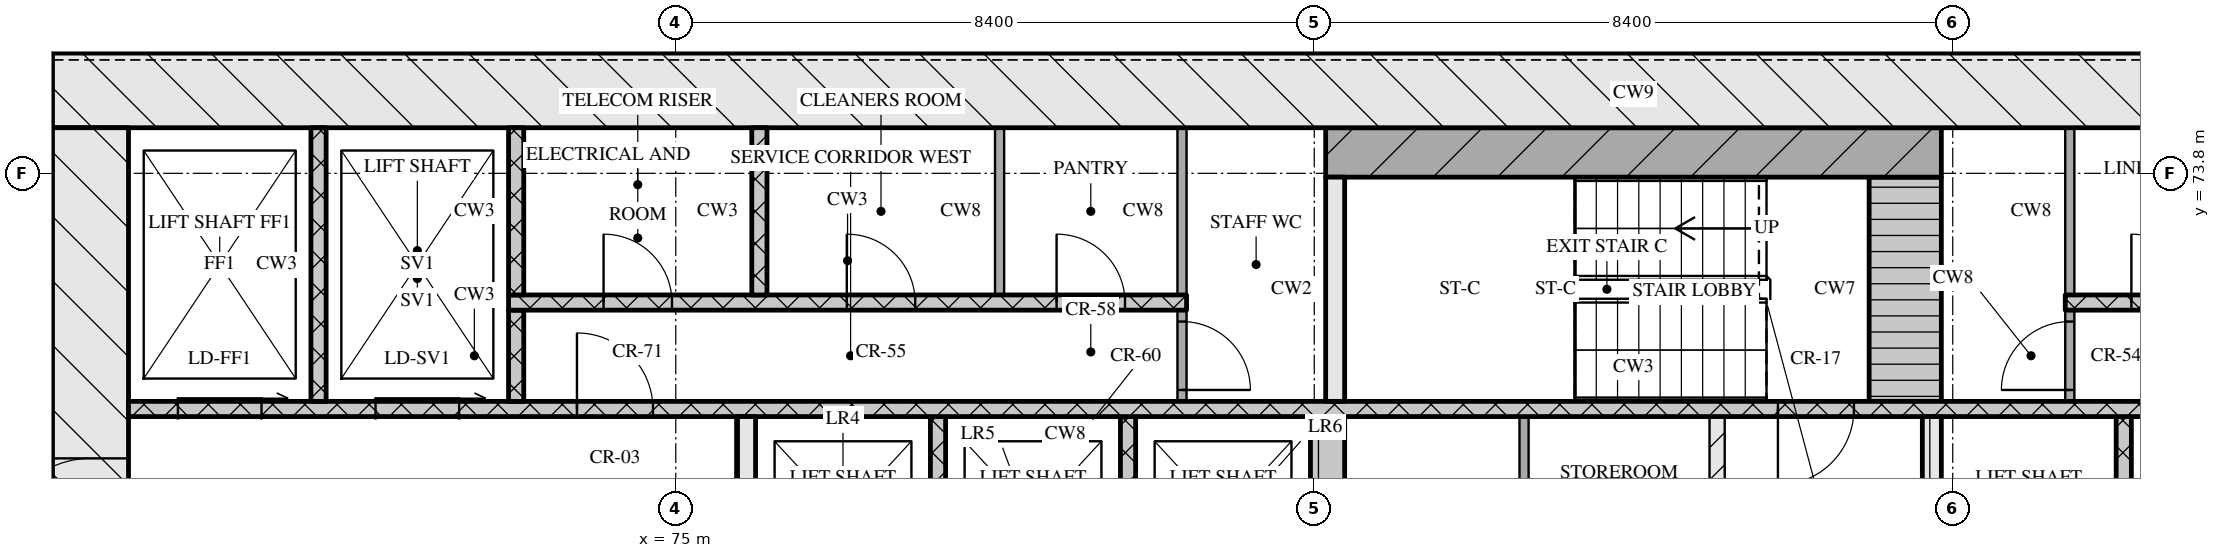
"""IFC4 building model, lengths in metres.
Left out: names, types, materials, properties, quantities, classifications, styles, units other than length and angle.
Written with IfcOpenShell. Run it as: python <this file> out.ifc"""

import sys

from ifc_helpers import new_model, si_unit, direction, frame, frame_2d, origin, place, context, subcontext, project, spatial, rectangle, extrude, element, fill, save


model = new_model("IFC4")
c1 = context("Model", 3, precision=1e-05, world=origin(), true_north=direction((0.0, 1.0)))
c2 = subcontext(c1, "Body", "Model", "MODEL_VIEW")
j1 = project(units=[si_unit("LENGTHUNIT", "METRE"), si_unit("PLANEANGLEUNIT", "RADIAN")], contexts=[c1])
p1 = place(None, origin())
s1 = spatial("IfcSite", under=j1, at=p1, CompositionType="ELEMENT")
p2 = place(p1, origin())
s2 = spatial("IfcBuilding", under=s1, at=p2, CompositionType="ELEMENT")
p3 = place(p2, frame((0.0, 0.0, 95.25)))
s3 = spatial("IfcBuildingStorey", under=s2, at=p3, CompositionType="ELEMENT", Elevation=95.25)
p4 = place(p3, frame((66.8, 74.9, 0.0), z_axis=(0.0, 0.0, 1.0), x_axis=(1.0, 0.0, 0.0)))
e1 = element("IfcWall", 1, at=p4, inside=s3, PredefinedType="SOLIDWALL", context=c2, shape_type="SweptSolid", body=[
    extrude(rectangle(XDim=41.6, YDim=1.0, at=frame_2d((20.8, 0.0))), origin(), (0.0, 0.0, 1.0), 3.32),
])
p5 = place(p3, frame((67.3, 62.4, 0.0), z_axis=(0.0, 0.0, 1.0), x_axis=(0.0, 1.0, 0.0)))
e2 = element("IfcWall", 2, at=p5, inside=s3, PredefinedType="SOLIDWALL", context=c2, shape_type="SweptSolid", body=[
    extrude(rectangle(XDim=12.0, YDim=1.0, at=frame_2d((6.0, 0.0))), origin(), (0.0, 0.0, 1.0), 3.32),
])
p6 = place(p5, frame((6.45, 0.0, 0.0)))
e3 = element("IfcOpeningElement", 3, at=p6, cuts=e2, PredefinedType="OPENING", context=c2, shape_type="SweptSolid", body=[
    extrude(rectangle(XDim=1.2, YDim=2.1, at=frame_2d((0.6, 1.05))), frame((0.0, 0.51, 0.0), z_axis=(0.0, -1.0, 0.0), x_axis=(1.0, 0.0, 0.0)), (0.0, 0.0, 1.0), 1.02),
])
for number, where, z_axis, x_axis in (
    (4, (78.45, 68.0, 0.0), (0.0, 0.0, 1.0), (0.0, 1.0, 0.0)),
    (5, (80.95, 68.0, 0.0), (0.0, 0.0, 1.0), (0.0, 1.0, 0.0)),
):
    element("IfcWall", number, at=place(p3, frame(where, z_axis=z_axis, x_axis=x_axis)), inside=s3, PredefinedType="SOLIDWALL", context=c2, shape_type="SweptSolid", body=[
        extrude(rectangle(XDim=2.6, YDim=0.2, at=frame_2d((1.3, 0.0))), origin(), (0.0, 0.0, 1.0), 3.32),
    ])
p7 = place(p3, frame((83.575, 68.0, 0.0), z_axis=(0.0, 0.0, 1.0), x_axis=(0.0, 1.0, 0.0)))
e6 = element("IfcWall", 6, at=p7, inside=s3, PredefinedType="SOLIDWALL", context=c2, shape_type="SweptSolid", body=[
    extrude(rectangle(XDim=2.6, YDim=0.45, at=frame_2d((1.3, 0.0))), origin(), (0.0, 0.0, 1.0), 3.32),
])
p8 = place(p3, frame((86.16, 68.0, 0.0), z_axis=(0.0, 0.0, 1.0), x_axis=(0.0, 1.0, 0.0)))
e7 = element("IfcWall", 7, at=p8, inside=s3, PredefinedType="PARTITIONING", context=c2, shape_type="SweptSolid", body=[
    extrude(rectangle(XDim=2.6, YDim=0.12, at=frame_2d((1.3, 0.0))), origin(), (0.0, 0.0, 1.0), 3.32),
])
p9 = place(p3, frame((88.7, 68.0, 0.0), z_axis=(0.0, 0.0, 1.0), x_axis=(0.0, 1.0, 0.0)))
e8 = element("IfcWall", 8, at=p9, inside=s3, PredefinedType="PARTITIONING", context=c2, shape_type="SweptSolid", body=[
    extrude(rectangle(XDim=2.6, YDim=0.2, at=frame_2d((1.3, 0.0))), origin(), (0.0, 0.0, 1.0), 3.32),
])
p10 = place(p3, frame((91.525, 68.0, 0.0), z_axis=(0.0, 0.0, 1.0), x_axis=(0.0, 1.0, 0.0)))
e9 = element("IfcWall", 9, at=p10, inside=s3, PredefinedType="SOLIDWALL", context=c2, shape_type="SweptSolid", body=[
    extrude(rectangle(XDim=2.6, YDim=0.25, at=frame_2d((1.3, 0.0))), origin(), (0.0, 0.0, 1.0), 3.32),
])
p11 = place(p3, frame((94.05, 68.0, 0.0), z_axis=(0.0, 0.0, 1.0), x_axis=(0.0, 1.0, 0.0)))
e10 = element("IfcWall", 10, at=p11, inside=s3, PredefinedType="SOLIDWALL", context=c2, shape_type="SweptSolid", body=[
    extrude(rectangle(XDim=2.6, YDim=0.2, at=frame_2d((1.3, 0.0))), origin(), (0.0, 0.0, 1.0), 3.32),
])
p12 = place(p3, frame((75.925, 68.3, 0.0), z_axis=(0.0, 0.0, 1.0), x_axis=(0.0, 1.0, 0.0)))
e11 = element("IfcWall", 11, at=p12, inside=s3, PredefinedType="SOLIDWALL", context=c2, shape_type="SweptSolid", body=[
    extrude(rectangle(XDim=2.3, YDim=0.25, at=frame_2d((1.15, 0.0))), origin(), (0.0, 0.0, 1.0), 3.32),
])
p13 = place(p3, frame((67.8, 70.7, 0.0), z_axis=(0.0, 0.0, 1.0), x_axis=(1.0, 0.0, 0.0)))
e12 = element("IfcWall", 12, at=p13, inside=s3, PredefinedType="SOLIDWALL", context=c2, shape_type="SweptSolid", body=[
    extrude(rectangle(XDim=39.6, YDim=0.2, at=frame_2d((19.8, 0.0))), origin(), (0.0, 0.0, 1.0), 3.32),
])
p14 = place(p13, frame((0.65, 0.0, 0.0)))
e13 = element("IfcOpeningElement", 13, at=p14, cuts=e12, PredefinedType="OPENING", context=c2, shape_type="SweptSolid", body=[
    extrude(rectangle(XDim=1.1, YDim=2.1, at=frame_2d((0.55, 1.05))), frame((0.0, 0.11, 0.0), z_axis=(0.0, -1.0, 0.0), x_axis=(1.0, 0.0, 0.0)), (0.0, 0.0, 1.0), 0.22),
])
p15 = place(p13, frame((3.25, 0.0, 0.0)))
e14 = element("IfcOpeningElement", 14, at=p15, cuts=e12, PredefinedType="OPENING", context=c2, shape_type="SweptSolid", body=[
    extrude(rectangle(XDim=1.1, YDim=2.1, at=frame_2d((0.55, 1.05))), frame((0.0, 0.11, 0.0), z_axis=(0.0, -1.0, 0.0), x_axis=(1.0, 0.0, 0.0)), (0.0, 0.0, 1.0), 0.22),
])
p16 = place(p13, frame((5.9, 0.0, 0.0)))
e15 = element("IfcOpeningElement", 15, at=p16, cuts=e12, PredefinedType="OPENING", context=c2, shape_type="SweptSolid", body=[
    extrude(rectangle(XDim=1.0, YDim=2.1, at=frame_2d((0.5, 1.05))), frame((0.0, 0.11, 0.0), z_axis=(0.0, -1.0, 0.0), x_axis=(1.0, 0.0, 0.0)), (0.0, 0.0, 1.0), 0.22),
])
p17 = place(p13, frame((21.7, 0.0, 0.0)))
e16 = element("IfcOpeningElement", 16, at=p17, cuts=e12, PredefinedType="OPENING", context=c2, shape_type="SweptSolid", body=[
    extrude(rectangle(XDim=1.0, YDim=2.1, at=frame_2d((0.5, 1.05))), frame((0.0, 0.11, 0.0), z_axis=(0.0, -1.0, 0.0), x_axis=(1.0, 0.0, 0.0)), (0.0, 0.0, 1.0), 0.22),
])
p18 = place(p13, frame((32.7, 0.0, 0.0)))
e17 = element("IfcOpeningElement", 17, at=p18, cuts=e12, PredefinedType="OPENING", context=c2, shape_type="SweptSolid", body=[
    extrude(rectangle(XDim=1.0, YDim=2.1, at=frame_2d((0.5, 1.05))), frame((0.0, 0.11, 0.0), z_axis=(0.0, -1.0, 0.0), x_axis=(1.0, 0.0, 0.0)), (0.0, 0.0, 1.0), 0.22),
])
p19 = place(p13, frame((35.25, 0.0, 0.0)))
e18 = element("IfcOpeningElement", 18, at=p19, cuts=e12, PredefinedType="OPENING", context=c2, shape_type="SweptSolid", body=[
    extrude(rectangle(XDim=1.1, YDim=2.1, at=frame_2d((0.55, 1.05))), frame((0.0, 0.11, 0.0), z_axis=(0.0, -1.0, 0.0), x_axis=(1.0, 0.0, 0.0)), (0.0, 0.0, 1.0), 0.22),
])
p20 = place(p13, frame((37.85, 0.0, 0.0)))
e19 = element("IfcOpeningElement", 19, at=p20, cuts=e12, PredefinedType="OPENING", context=c2, shape_type="SweptSolid", body=[
    extrude(rectangle(XDim=1.1, YDim=2.1, at=frame_2d((0.55, 1.05))), frame((0.0, 0.11, 0.0), z_axis=(0.0, -1.0, 0.0), x_axis=(1.0, 0.0, 0.0)), (0.0, 0.0, 1.0), 0.22),
])
p21 = place(p3, frame((70.3, 70.8, 0.0), z_axis=(0.0, 0.0, 1.0), x_axis=(0.0, 1.0, 0.0)))
e20 = element("IfcWall", 20, at=p21, inside=s3, PredefinedType="SOLIDWALL", context=c2, shape_type="SweptSolid", body=[
    extrude(rectangle(XDim=3.6, YDim=0.2, at=frame_2d((1.8, 0.0))), origin(), (0.0, 0.0, 1.0), 3.32),
])
p22 = place(p3, frame((72.9, 70.8, 0.0), z_axis=(0.0, 0.0, 1.0), x_axis=(0.0, 1.0, 0.0)))
e21 = element("IfcWall", 21, at=p22, inside=s3, PredefinedType="SOLIDWALL", context=c2, shape_type="SweptSolid", body=[
    extrude(rectangle(XDim=1.2, YDim=0.2, at=frame_2d((0.6, 0.0))), origin(), (0.0, 0.0, 1.0), 3.32),
])
p23 = place(p3, frame((81.66, 70.8, 0.0), z_axis=(0.0, 0.0, 1.0), x_axis=(0.0, 1.0, 0.0)))
e22 = element("IfcWall", 22, at=p23, inside=s3, PredefinedType="PARTITIONING", context=c2, shape_type="SweptSolid", body=[
    extrude(rectangle(XDim=1.2, YDim=0.12, at=frame_2d((0.6, 0.0))), origin(), (0.0, 0.0, 1.0), 3.32),
])
p24 = place(p23, frame((0.15, 0.0, 0.0)))
e23 = element("IfcOpeningElement", 23, at=p24, cuts=e22, PredefinedType="OPENING", context=c2, shape_type="SweptSolid", body=[
    extrude(rectangle(XDim=0.9, YDim=2.1, at=frame_2d((0.45, 1.05))), frame((0.0, 0.07, 0.0), z_axis=(0.0, -1.0, 0.0), x_axis=(1.0, 0.0, 0.0)), (0.0, 0.0, 1.0), 0.14),
])
p25 = place(p3, frame((83.675, 70.8, 0.0), z_axis=(0.0, 0.0, 1.0), x_axis=(0.0, 1.0, 0.0)))
e24 = element("IfcWall", 24, at=p25, inside=s3, PredefinedType="SOLIDWALL", context=c2, shape_type="SweptSolid", body=[
    extrude(rectangle(XDim=2.95, YDim=0.25, at=frame_2d((1.475, 0.0))), origin(), (0.0, 0.0, 1.0), 3.32),
])
p26 = place(p3, frame((91.175, 70.8, 0.0), z_axis=(0.0, 0.0, 1.0), x_axis=(0.0, 1.0, 0.0)))
e25 = element("IfcWall", 25, at=p26, inside=s3, PredefinedType="SOLIDWALL", context=c2, shape_type="SweptSolid", body=[
    extrude(rectangle(XDim=2.95, YDim=0.95, at=frame_2d((1.475, 0.0))), origin(), (0.0, 0.0, 1.0), 3.32),
])
p27 = place(p3, frame((93.34, 70.8, 0.0), z_axis=(0.0, 0.0, 1.0), x_axis=(0.0, 1.0, 0.0)))
e26 = element("IfcWall", 26, at=p27, inside=s3, PredefinedType="PARTITIONING", context=c2, shape_type="SweptSolid", body=[
    extrude(rectangle(XDim=1.2, YDim=0.12, at=frame_2d((0.6, 0.0))), origin(), (0.0, 0.0, 1.0), 3.32),
])
p28 = place(p27, frame((0.15, 0.0, 0.0)))
e27 = element("IfcOpeningElement", 27, at=p28, cuts=e26, PredefinedType="OPENING", context=c2, shape_type="SweptSolid", body=[
    extrude(rectangle(XDim=0.9, YDim=2.1, at=frame_2d((0.45, 1.05))), frame((0.0, 0.07, 0.0), z_axis=(0.0, -1.0, 0.0), x_axis=(1.0, 0.0, 0.0)), (0.0, 0.0, 1.0), 0.14),
])
p29 = place(p3, frame((72.8, 72.1, 0.0), z_axis=(0.0, 0.0, 1.0), x_axis=(1.0, 0.0, 0.0)))
e28 = element("IfcWall", 28, at=p29, inside=s3, PredefinedType="SOLIDWALL", context=c2, shape_type="SweptSolid", body=[
    extrude(rectangle(XDim=8.92, YDim=0.2, at=frame_2d((4.46, 0.0))), origin(), (0.0, 0.0, 1.0), 3.32),
])
p30 = place(p29, frame((1.25, 0.0, 0.0)))
e29 = element("IfcOpeningElement", 29, at=p30, cuts=e28, PredefinedType="OPENING", context=c2, shape_type="SweptSolid", body=[
    extrude(rectangle(XDim=0.9, YDim=2.1, at=frame_2d((0.45, 1.05))), frame((0.0, 0.11, 0.0), z_axis=(0.0, -1.0, 0.0), x_axis=(1.0, 0.0, 0.0)), (0.0, 0.0, 1.0), 0.22),
])
p31 = place(p29, frame((4.45, 0.0, 0.0)))
e30 = element("IfcOpeningElement", 30, at=p31, cuts=e28, PredefinedType="OPENING", context=c2, shape_type="SweptSolid", body=[
    extrude(rectangle(XDim=0.9, YDim=2.1, at=frame_2d((0.45, 1.05))), frame((0.0, 0.11, 0.0), z_axis=(0.0, -1.0, 0.0), x_axis=(1.0, 0.0, 0.0)), (0.0, 0.0, 1.0), 0.22),
])
p32 = place(p29, frame((7.21, 0.0, 0.0)))
e31 = element("IfcOpeningElement", 31, at=p32, cuts=e28, PredefinedType="OPENING", context=c2, shape_type="SweptSolid", body=[
    extrude(rectangle(XDim=0.9, YDim=2.1, at=frame_2d((0.45, 1.05))), frame((0.0, 0.11, 0.0), z_axis=(0.0, -1.0, 0.0), x_axis=(1.0, 0.0, 0.0)), (0.0, 0.0, 1.0), 0.22),
])
p33 = place(p3, frame((93.28, 72.1, 0.0), z_axis=(0.0, 0.0, 1.0), x_axis=(1.0, 0.0, 0.0)))
e32 = element("IfcWall", 32, at=p33, inside=s3, PredefinedType="SOLIDWALL", context=c2, shape_type="SweptSolid", body=[
    extrude(rectangle(XDim=9.12, YDim=0.2, at=frame_2d((4.56, 0.0))), origin(), (0.0, 0.0, 1.0), 3.32),
])
p34 = place(p33, frame((0.87, 0.0, 0.0)))
e33 = element("IfcOpeningElement", 33, at=p34, cuts=e32, PredefinedType="OPENING", context=c2, shape_type="SweptSolid", body=[
    extrude(rectangle(XDim=0.9, YDim=2.1, at=frame_2d((0.45, 1.05))), frame((0.0, 0.11, 0.0), z_axis=(0.0, -1.0, 0.0), x_axis=(1.0, 0.0, 0.0)), (0.0, 0.0, 1.0), 0.22),
])
p35 = place(p33, frame((3.73, 0.0, 0.0)))
e34 = element("IfcOpeningElement", 34, at=p35, cuts=e32, PredefinedType="OPENING", context=c2, shape_type="SweptSolid", body=[
    extrude(rectangle(XDim=0.9, YDim=2.1, at=frame_2d((0.45, 1.05))), frame((0.0, 0.11, 0.0), z_axis=(0.0, -1.0, 0.0), x_axis=(1.0, 0.0, 0.0)), (0.0, 0.0, 1.0), 0.22),
])
p36 = place(p33, frame((6.97, 0.0, 0.0)))
e35 = element("IfcOpeningElement", 35, at=p36, cuts=e32, PredefinedType="OPENING", context=c2, shape_type="SweptSolid", body=[
    extrude(rectangle(XDim=0.9, YDim=2.1, at=frame_2d((0.45, 1.05))), frame((0.0, 0.11, 0.0), z_axis=(0.0, -1.0, 0.0), x_axis=(1.0, 0.0, 0.0)), (0.0, 0.0, 1.0), 0.22),
])
for number, where, z_axis, x_axis in (
    (36, (72.9, 72.2, 0.0), (0.0, 0.0, 1.0), (0.0, 1.0, 0.0)),
    (37, (76.1, 72.2, 0.0), (0.0, 0.0, 1.0), (0.0, 1.0, 0.0)),
):
    element("IfcWall", number, at=place(p3, frame(where, z_axis=z_axis, x_axis=x_axis)), inside=s3, PredefinedType="SOLIDWALL", context=c2, shape_type="SweptSolid", body=[
        extrude(rectangle(XDim=2.2, YDim=0.2, at=frame_2d((1.1, 0.0))), origin(), (0.0, 0.0, 1.0), 3.32),
    ])
for number, where, z_axis, x_axis in (
    (38, (79.26, 72.2, 0.0), (0.0, 0.0, 1.0), (0.0, 1.0, 0.0)),
    (39, (81.66, 72.2, 0.0), (0.0, 0.0, 1.0), (0.0, 1.0, 0.0)),
    (40, (93.34, 72.2, 0.0), (0.0, 0.0, 1.0), (0.0, 1.0, 0.0)),
):
    element("IfcWall", number, at=place(p3, frame(where, z_axis=z_axis, x_axis=x_axis)), inside=s3, PredefinedType="PARTITIONING", context=c2, shape_type="SweptSolid", body=[
        extrude(rectangle(XDim=2.2, YDim=0.12, at=frame_2d((1.1, 0.0))), origin(), (0.0, 0.0, 1.0), 3.32),
    ])
p37 = place(p3, frame((83.55, 74.075, 0.0), z_axis=(0.0, 0.0, 1.0), x_axis=(1.0, 0.0, 0.0)))
e41 = element("IfcWall", 41, at=p37, inside=s3, PredefinedType="SOLIDWALL", context=c2, shape_type="SweptSolid", body=[
    extrude(rectangle(XDim=8.1, YDim=0.65, at=frame_2d((4.05, 0.0))), origin(), (0.0, 0.0, 1.0), 3.32),
])
p38 = place(p6, origin())
e42 = element("IfcDoor", 42, at=p38, inside=s3, OperationType="SINGLE_SWING_LEFT", PredefinedType="DOOR", context=c2, shape_type="SweptSolid", body=[
    extrude(rectangle(XDim=1.2, YDim=2.1, at=frame_2d((0.6, 1.05))), frame((0.0, 0.025, 0.0), z_axis=(0.0, -1.0, 0.0), x_axis=(1.0, 0.0, 0.0)), (0.0, 0.0, 1.0), 0.05),
])
fill(e3, e42)
p39 = place(p14, origin())
e43 = element("IfcDoor", 43, at=p39, inside=s3, OperationType="SLIDING_TO_RIGHT", PredefinedType="DOOR", context=c2, shape_type="SweptSolid", body=[
    extrude(rectangle(XDim=1.1, YDim=2.1, at=frame_2d((0.55, 1.05))), frame((0.0, 0.025, 0.0), z_axis=(0.0, -1.0, 0.0), x_axis=(1.0, 0.0, 0.0)), (0.0, 0.0, 1.0), 0.05),
])
fill(e13, e43)
p40 = place(p15, origin())
e44 = element("IfcDoor", 44, at=p40, inside=s3, OperationType="SLIDING_TO_RIGHT", PredefinedType="DOOR", context=c2, shape_type="SweptSolid", body=[
    extrude(rectangle(XDim=1.1, YDim=2.1, at=frame_2d((0.55, 1.05))), frame((0.0, 0.025, 0.0), z_axis=(0.0, -1.0, 0.0), x_axis=(1.0, 0.0, 0.0)), (0.0, 0.0, 1.0), 0.05),
])
fill(e14, e44)
p41 = place(p16, origin())
e45 = element("IfcDoor", 45, at=p41, inside=s3, OperationType="SINGLE_SWING_LEFT", PredefinedType="DOOR", context=c2, shape_type="SweptSolid", body=[
    extrude(rectangle(XDim=1.0, YDim=2.1, at=frame_2d((0.5, 1.05))), frame((0.0, 0.025, 0.0), z_axis=(0.0, -1.0, 0.0), x_axis=(1.0, 0.0, 0.0)), (0.0, 0.0, 1.0), 0.05),
])
fill(e15, e45)
p42 = place(p17, origin())
e46 = element("IfcDoor", 46, at=p42, inside=s3, OperationType="SINGLE_SWING_RIGHT", PredefinedType="DOOR", context=c2, shape_type="SweptSolid", body=[
    extrude(rectangle(XDim=1.0, YDim=2.1, at=frame_2d((0.5, 1.05))), frame((0.0, 0.025, 0.0), z_axis=(0.0, -1.0, 0.0), x_axis=(1.0, 0.0, 0.0)), (0.0, 0.0, 1.0), 0.05),
])
fill(e16, e46)
p43 = place(p24, origin())
e47 = element("IfcDoor", 47, at=p43, inside=s3, OperationType="SINGLE_SWING_RIGHT", PredefinedType="DOOR", context=c2, shape_type="SweptSolid", body=[
    extrude(rectangle(XDim=0.9, YDim=2.1, at=frame_2d((0.45, 1.05))), frame((0.0, 0.025, 0.0), z_axis=(0.0, -1.0, 0.0), x_axis=(1.0, 0.0, 0.0)), (0.0, 0.0, 1.0), 0.05),
])
fill(e23, e47)
p44 = place(p28, origin())
e48 = element("IfcDoor", 48, at=p44, inside=s3, OperationType="SINGLE_SWING_LEFT", PredefinedType="DOOR", context=c2, shape_type="SweptSolid", body=[
    extrude(rectangle(XDim=0.9, YDim=2.1, at=frame_2d((0.45, 1.05))), frame((0.0, 0.025, 0.0), z_axis=(0.0, -1.0, 0.0), x_axis=(1.0, 0.0, 0.0)), (0.0, 0.0, 1.0), 0.05),
])
fill(e27, e48)
p45 = place(p30, origin())
e49 = element("IfcDoor", 49, at=p45, inside=s3, OperationType="SINGLE_SWING_LEFT", PredefinedType="DOOR", context=c2, shape_type="SweptSolid", body=[
    extrude(rectangle(XDim=0.9, YDim=2.1, at=frame_2d((0.45, 1.05))), frame((0.0, 0.025, 0.0), z_axis=(0.0, -1.0, 0.0), x_axis=(1.0, 0.0, 0.0)), (0.0, 0.0, 1.0), 0.05),
])
fill(e29, e49)
p46 = place(p31, origin())
e50 = element("IfcDoor", 50, at=p46, inside=s3, OperationType="SINGLE_SWING_LEFT", PredefinedType="DOOR", context=c2, shape_type="SweptSolid", body=[
    extrude(rectangle(XDim=0.9, YDim=2.1, at=frame_2d((0.45, 1.05))), frame((0.0, 0.025, 0.0), z_axis=(0.0, -1.0, 0.0), x_axis=(1.0, 0.0, 0.0)), (0.0, 0.0, 1.0), 0.05),
])
fill(e30, e50)
p47 = place(p32, origin())
e51 = element("IfcDoor", 51, at=p47, inside=s3, OperationType="SINGLE_SWING_LEFT", PredefinedType="DOOR", context=c2, shape_type="SweptSolid", body=[
    extrude(rectangle(XDim=0.9, YDim=2.1, at=frame_2d((0.45, 1.05))), frame((0.0, 0.025, 0.0), z_axis=(0.0, -1.0, 0.0), x_axis=(1.0, 0.0, 0.0)), (0.0, 0.0, 1.0), 0.05),
])
fill(e31, e51)
p48 = place(p34, origin())
e52 = element("IfcDoor", 52, at=p48, inside=s3, OperationType="SINGLE_SWING_LEFT", PredefinedType="DOOR", context=c2, shape_type="SweptSolid", body=[
    extrude(rectangle(XDim=0.9, YDim=2.1, at=frame_2d((0.45, 1.05))), frame((0.0, 0.025, 0.0), z_axis=(0.0, -1.0, 0.0), x_axis=(1.0, 0.0, 0.0)), (0.0, 0.0, 1.0), 0.05),
])
fill(e33, e52)
save(model, sys.argv[1])
